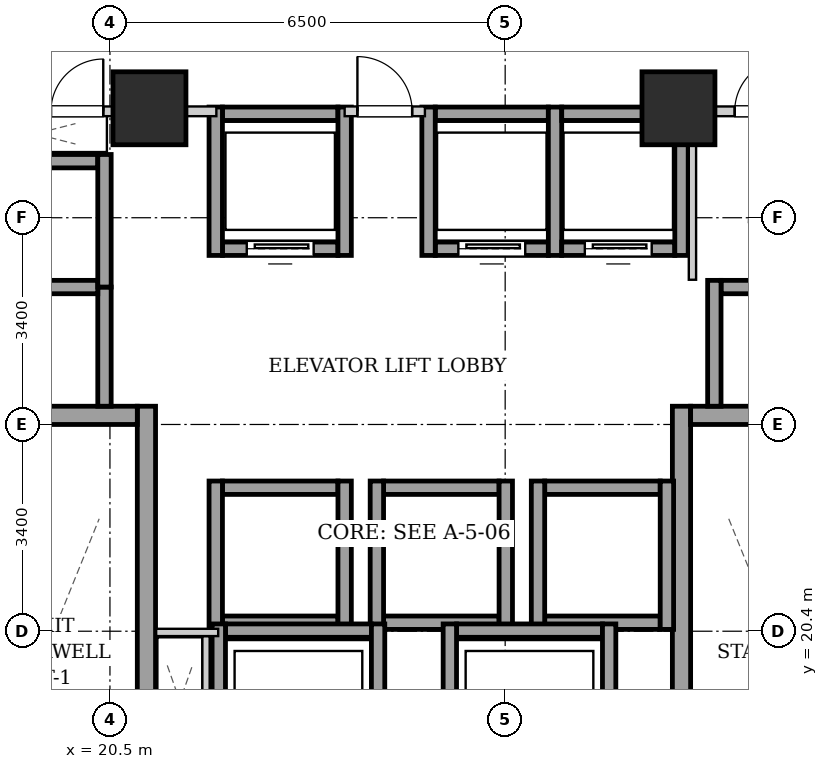
"""IFC4 building model, lengths in metres.
Left out: names, types, materials, properties, quantities, classifications, styles, units other than length and angle.
Written with IfcOpenShell. Run it as: python <this file> out.ifc"""

import sys

from ifc_helpers import new_model, si_unit, direction, frame, frame_2d, origin, origin_2d, place, context, subcontext, project, spatial, rectangle, extrude, element, fill, save


model = new_model("IFC4")
c1 = context("Model", 3, precision=1e-05, world=origin(), true_north=direction((0.0, 1.0)))
c2 = subcontext(c1, "Body", "Model", "MODEL_VIEW")
j1 = project(units=[si_unit("LENGTHUNIT", "METRE"), si_unit("PLANEANGLEUNIT", "RADIAN")], contexts=[c1])
p1 = place(None, origin())
s1 = spatial("IfcSite", under=j1, at=p1, CompositionType="ELEMENT")
p2 = place(p1, origin())
s2 = spatial("IfcBuilding", under=s1, at=p2, CompositionType="ELEMENT")
p3 = place(p2, frame((0.0, 0.0, 51.4)))
s3 = spatial("IfcBuildingStorey", under=s2, at=p3, CompositionType="ELEMENT", Elevation=51.4)
for number, where, z_axis, x_axis in (
    (1, (21.15, 29.0, 0.0), (0.0, 0.0, 1.0), (1.0, 0.0, 0.0)),
    (2, (29.85, 29.0, 0.0), (0.0, 0.0, 1.0), (1.0, 0.0, 0.0)),
):
    element("IfcColumn", number, at=place(p3, frame(where, z_axis=z_axis, x_axis=x_axis)), inside=s3, PredefinedType="COLUMN", context=c2, shape_type="SweptSolid", body=[
        extrude(rectangle(XDim=1.2, YDim=1.2, at=origin_2d()), origin(), (0.0, 0.0, 1.0), 3.2),
    ])
p4 = place(p3, frame((21.1, 15.1, 0.0), z_axis=(0.0, 0.0, 1.0), x_axis=(0.0, 1.0, 0.0)))
e3 = element("IfcWall", 3, at=p4, inside=s3, PredefinedType="SHEAR", context=c2, shape_type="SweptSolid", body=[
    extrude(rectangle(XDim=9.0, YDim=0.3, at=frame_2d((4.5, 0.0))), origin(), (0.0, 0.0, 1.0), 2.94),
])
p5 = place(p3, frame((18.1, 23.95, 0.0), z_axis=(0.0, 0.0, 1.0), x_axis=(1.0, 0.0, 0.0)))
e4 = element("IfcWall", 4, at=p5, inside=s3, PredefinedType="SHEAR", context=c2, shape_type="SweptSolid", body=[
    extrude(rectangle(XDim=2.85, YDim=0.3, at=frame_2d((1.425, 0.0))), origin(), (0.0, 0.0, 1.0), 2.94),
])
p6 = place(p3, frame((29.9, 15.1, 0.0), z_axis=(0.0, 0.0, 1.0), x_axis=(0.0, 1.0, 0.0)))
e5 = element("IfcWall", 5, at=p6, inside=s3, PredefinedType="SHEAR", context=c2, shape_type="SweptSolid", body=[
    extrude(rectangle(XDim=9.0, YDim=0.3, at=frame_2d((4.5, 0.0))), origin(), (0.0, 0.0, 1.0), 2.94),
])
p7 = place(p3, frame((30.05, 23.95, 0.0), z_axis=(0.0, 0.0, 1.0), x_axis=(1.0, 0.0, 0.0)))
e6 = element("IfcWall", 6, at=p7, inside=s3, PredefinedType="SHEAR", context=c2, shape_type="SweptSolid", body=[
    extrude(rectangle(XDim=2.85, YDim=0.3, at=frame_2d((1.425, 0.0))), origin(), (0.0, 0.0, 1.0), 2.94),
])
p8 = place(p3, frame((22.35, 26.69, 0.0), z_axis=(0.0, 0.0, 1.0), x_axis=(1.0, 0.0, 0.0)))
e7 = element("IfcWall", 7, at=p8, inside=s3, PredefinedType="SHEAR", context=c2, shape_type="SweptSolid", body=[
    extrude(rectangle(XDim=1.9, YDim=0.22, at=frame_2d((0.95, 0.0))), origin(), (0.0, 0.0, 1.0), 2.94),
])
p9 = place(p8, frame((0.4, 0.0, 0.0)))
e8 = element("IfcOpeningElement", 8, at=p9, cuts=e7, PredefinedType="OPENING", context=c2, shape_type="SweptSolid", body=[
    extrude(rectangle(XDim=1.1, YDim=2.15, at=frame_2d((0.55, 1.075))), frame((0.0, 0.12, 0.0), z_axis=(0.0, -1.0, 0.0), x_axis=(1.0, 0.0, 0.0)), (0.0, 0.0, 1.0), 0.24),
])
p10 = place(p3, frame((22.35, 28.91, 0.0), z_axis=(0.0, 0.0, 1.0), x_axis=(1.0, 0.0, 0.0)))
e9 = element("IfcWall", 9, at=p10, inside=s3, PredefinedType="SHEAR", context=c2, shape_type="SweptSolid", body=[
    extrude(rectangle(XDim=1.9, YDim=0.22, at=frame_2d((0.95, 0.0))), origin(), (0.0, 0.0, 1.0), 2.94),
])
for number, where, z_axis, x_axis in (
    (10, (22.24, 26.58, 0.0), (0.0, 0.0, 1.0), (0.0, 1.0, 0.0)),
    (11, (24.36, 26.58, 0.0), (0.0, 0.0, 1.0), (0.0, 1.0, 0.0)),
):
    element("IfcWall", number, at=place(p3, frame(where, z_axis=z_axis, x_axis=x_axis)), inside=s3, PredefinedType="SHEAR", context=c2, shape_type="SweptSolid", body=[
        extrude(rectangle(XDim=2.44, YDim=0.22, at=frame_2d((1.22, 0.0))), origin(), (0.0, 0.0, 1.0), 2.94),
    ])
p11 = place(p3, frame((25.85, 26.69, 0.0), z_axis=(0.0, 0.0, 1.0), x_axis=(1.0, 0.0, 0.0)))
e12 = element("IfcWall", 12, at=p11, inside=s3, PredefinedType="SHEAR", context=c2, shape_type="SweptSolid", body=[
    extrude(rectangle(XDim=1.86, YDim=0.22, at=frame_2d((0.93, 0.0))), origin(), (0.0, 0.0, 1.0), 2.94),
])
p12 = place(p11, frame((0.38, 0.0, 0.0)))
e13 = element("IfcOpeningElement", 13, at=p12, cuts=e12, PredefinedType="OPENING", context=c2, shape_type="SweptSolid", body=[
    extrude(rectangle(XDim=1.1, YDim=2.15, at=frame_2d((0.55, 1.075))), frame((0.0, 0.12, 0.0), z_axis=(0.0, -1.0, 0.0), x_axis=(1.0, 0.0, 0.0)), (0.0, 0.0, 1.0), 0.24),
])
p13 = place(p3, frame((25.85, 28.91, 0.0), z_axis=(0.0, 0.0, 1.0), x_axis=(1.0, 0.0, 0.0)))
e14 = element("IfcWall", 14, at=p13, inside=s3, PredefinedType="SHEAR", context=c2, shape_type="SweptSolid", body=[
    extrude(rectangle(XDim=1.86, YDim=0.22, at=frame_2d((0.93, 0.0))), origin(), (0.0, 0.0, 1.0), 2.94),
])
for number, where, z_axis, x_axis in (
    (15, (25.74, 26.58, 0.0), (0.0, 0.0, 1.0), (0.0, 1.0, 0.0)),
    (16, (27.82, 26.58, 0.0), (0.0, 0.0, 1.0), (0.0, 1.0, 0.0)),
):
    element("IfcWall", number, at=place(p3, frame(where, z_axis=z_axis, x_axis=x_axis)), inside=s3, PredefinedType="SHEAR", context=c2, shape_type="SweptSolid", body=[
        extrude(rectangle(XDim=2.44, YDim=0.22, at=frame_2d((1.22, 0.0))), origin(), (0.0, 0.0, 1.0), 2.94),
    ])
p14 = place(p3, frame((27.93, 26.69, 0.0), z_axis=(0.0, 0.0, 1.0), x_axis=(1.0, 0.0, 0.0)))
e17 = element("IfcWall", 17, at=p14, inside=s3, PredefinedType="SHEAR", context=c2, shape_type="SweptSolid", body=[
    extrude(rectangle(XDim=1.86, YDim=0.22, at=frame_2d((0.93, 0.0))), origin(), (0.0, 0.0, 1.0), 2.94),
])
p15 = place(p14, frame((0.38, 0.0, 0.0)))
e18 = element("IfcOpeningElement", 18, at=p15, cuts=e17, PredefinedType="OPENING", context=c2, shape_type="SweptSolid", body=[
    extrude(rectangle(XDim=1.1, YDim=2.15, at=frame_2d((0.55, 1.075))), frame((0.0, 0.12, 0.0), z_axis=(0.0, -1.0, 0.0), x_axis=(1.0, 0.0, 0.0)), (0.0, 0.0, 1.0), 0.24),
])
p16 = place(p3, frame((27.93, 28.91, 0.0), z_axis=(0.0, 0.0, 1.0), x_axis=(1.0, 0.0, 0.0)))
e19 = element("IfcWall", 19, at=p16, inside=s3, PredefinedType="SHEAR", context=c2, shape_type="SweptSolid", body=[
    extrude(rectangle(XDim=1.86, YDim=0.22, at=frame_2d((0.93, 0.0))), origin(), (0.0, 0.0, 1.0), 2.94),
])
p17 = place(p3, frame((29.9, 26.58, 0.0), z_axis=(0.0, 0.0, 1.0), x_axis=(0.0, 1.0, 0.0)))
e20 = element("IfcWall", 20, at=p17, inside=s3, PredefinedType="SHEAR", context=c2, shape_type="SweptSolid", body=[
    extrude(rectangle(XDim=2.44, YDim=0.22, at=frame_2d((1.22, 0.0))), origin(), (0.0, 0.0, 1.0), 2.94),
])
for number, where, z_axis, x_axis in (
    (21, (22.35, 20.54, 0.0), (0.0, 0.0, 1.0), (1.0, 0.0, 0.0)),
    (22, (22.35, 22.76, 0.0), (0.0, 0.0, 1.0), (1.0, 0.0, 0.0)),
):
    element("IfcWall", number, at=place(p3, frame(where, z_axis=z_axis, x_axis=x_axis)), inside=s3, PredefinedType="SHEAR", context=c2, shape_type="SweptSolid", body=[
        extrude(rectangle(XDim=1.9, YDim=0.22, at=frame_2d((0.95, 0.0))), origin(), (0.0, 0.0, 1.0), 2.94),
    ])
for number, where, z_axis, x_axis in (
    (23, (22.24, 20.43, 0.0), (0.0, 0.0, 1.0), (0.0, 1.0, 0.0)),
    (24, (24.36, 20.43, 0.0), (0.0, 0.0, 1.0), (0.0, 1.0, 0.0)),
):
    element("IfcWall", number, at=place(p3, frame(where, z_axis=z_axis, x_axis=x_axis)), inside=s3, PredefinedType="SHEAR", context=c2, shape_type="SweptSolid", body=[
        extrude(rectangle(XDim=2.44, YDim=0.22, at=frame_2d((1.22, 0.0))), origin(), (0.0, 0.0, 1.0), 2.94),
    ])
for number, where, z_axis, x_axis in (
    (25, (25.0, 20.54, 0.0), (0.0, 0.0, 1.0), (1.0, 0.0, 0.0)),
    (26, (25.0, 22.76, 0.0), (0.0, 0.0, 1.0), (1.0, 0.0, 0.0)),
):
    element("IfcWall", number, at=place(p3, frame(where, z_axis=z_axis, x_axis=x_axis)), inside=s3, PredefinedType="SHEAR", context=c2, shape_type="SweptSolid", body=[
        extrude(rectangle(XDim=1.9, YDim=0.22, at=frame_2d((0.95, 0.0))), origin(), (0.0, 0.0, 1.0), 2.94),
    ])
for number, where, z_axis, x_axis in (
    (27, (24.89, 20.43, 0.0), (0.0, 0.0, 1.0), (0.0, 1.0, 0.0)),
    (28, (27.01, 20.43, 0.0), (0.0, 0.0, 1.0), (0.0, 1.0, 0.0)),
):
    element("IfcWall", number, at=place(p3, frame(where, z_axis=z_axis, x_axis=x_axis)), inside=s3, PredefinedType="SHEAR", context=c2, shape_type="SweptSolid", body=[
        extrude(rectangle(XDim=2.44, YDim=0.22, at=frame_2d((1.22, 0.0))), origin(), (0.0, 0.0, 1.0), 2.94),
    ])
for number, where, z_axis, x_axis in (
    (29, (27.65, 20.54, 0.0), (0.0, 0.0, 1.0), (1.0, 0.0, 0.0)),
    (30, (27.65, 22.76, 0.0), (0.0, 0.0, 1.0), (1.0, 0.0, 0.0)),
):
    element("IfcWall", number, at=place(p3, frame(where, z_axis=z_axis, x_axis=x_axis)), inside=s3, PredefinedType="SHEAR", context=c2, shape_type="SweptSolid", body=[
        extrude(rectangle(XDim=1.9, YDim=0.22, at=frame_2d((0.95, 0.0))), origin(), (0.0, 0.0, 1.0), 2.94),
    ])
for number, where, z_axis, x_axis in (
    (31, (27.54, 20.43, 0.0), (0.0, 0.0, 1.0), (0.0, 1.0, 0.0)),
    (32, (29.66, 20.43, 0.0), (0.0, 0.0, 1.0), (0.0, 1.0, 0.0)),
):
    element("IfcWall", number, at=place(p3, frame(where, z_axis=z_axis, x_axis=x_axis)), inside=s3, PredefinedType="SHEAR", context=c2, shape_type="SweptSolid", body=[
        extrude(rectangle(XDim=2.44, YDim=0.22, at=frame_2d((1.22, 0.0))), origin(), (0.0, 0.0, 1.0), 2.94),
    ])
p18 = place(p3, frame((20.41, 24.1, 0.0), z_axis=(0.0, 0.0, 1.0), x_axis=(0.0, 1.0, 0.0)))
e33 = element("IfcWall", 33, at=p18, inside=s3, PredefinedType="SHEAR", context=c2, shape_type="SweptSolid", body=[
    extrude(rectangle(XDim=1.96, YDim=0.22, at=frame_2d((0.98, 0.0))), origin(), (0.0, 0.0, 1.0), 2.94),
])
for number, where, z_axis, x_axis in (
    (34, (18.4, 26.06, 0.0), (0.0, 0.0, 1.0), (1.0, 0.0, 0.0)),
    (35, (18.4, 28.13, 0.0), (0.0, 0.0, 1.0), (1.0, 0.0, 0.0)),
):
    element("IfcWall", number, at=place(p3, frame(where, z_axis=z_axis, x_axis=x_axis)), inside=s3, PredefinedType="SHEAR", context=c2, shape_type="SweptSolid", body=[
        extrude(rectangle(XDim=1.9, YDim=0.22, at=frame_2d((0.95, 0.0))), origin(), (0.0, 0.0, 1.0), 2.94),
    ])
p19 = place(p3, frame((20.41, 26.06, 0.0), z_axis=(0.0, 0.0, 1.0), x_axis=(0.0, 1.0, 0.0)))
e36 = element("IfcWall", 36, at=p19, inside=s3, PredefinedType="SHEAR", context=c2, shape_type="SweptSolid", body=[
    extrude(rectangle(XDim=2.18, YDim=0.22, at=frame_2d((1.09, 0.0))), origin(), (0.0, 0.0, 1.0), 2.94),
])
p20 = place(p3, frame((30.55, 26.06, 0.0), z_axis=(0.0, 0.0, 1.0), x_axis=(1.0, 0.0, 0.0)))
e37 = element("IfcWall", 37, at=p20, inside=s3, PredefinedType="SHEAR", context=c2, shape_type="SweptSolid", body=[
    extrude(rectangle(XDim=1.9, YDim=0.22, at=frame_2d((0.95, 0.0))), origin(), (0.0, 0.0, 1.0), 2.94),
])
p21 = place(p3, frame((30.44, 24.1, 0.0), z_axis=(0.0, 0.0, 1.0), x_axis=(0.0, 1.0, 0.0)))
e38 = element("IfcWall", 38, at=p21, inside=s3, PredefinedType="SHEAR", context=c2, shape_type="SweptSolid", body=[
    extrude(rectangle(XDim=2.07, YDim=0.22, at=frame_2d((1.035, 0.0))), origin(), (0.0, 0.0, 1.0), 2.94),
])
p22 = place(p3, frame((22.4, 20.41, 0.0), z_axis=(0.0, 0.0, 1.0), x_axis=(1.0, 0.0, 0.0)))
e39 = element("IfcWall", 39, at=p22, inside=s3, PredefinedType="SHEAR", context=c2, shape_type="SweptSolid", body=[
    extrude(rectangle(XDim=2.4, YDim=0.22, at=frame_2d((1.2, 0.0))), origin(), (0.0, 0.0, 1.0), 2.94),
])
for number, where, z_axis, x_axis in (
    (40, (22.29, 17.98, 0.0), (0.0, 0.0, 1.0), (0.0, 1.0, 0.0)),
    (41, (24.91, 17.98, 0.0), (0.0, 0.0, 1.0), (0.0, 1.0, 0.0)),
):
    element("IfcWall", number, at=place(p3, frame(where, z_axis=z_axis, x_axis=x_axis)), inside=s3, PredefinedType="SHEAR", context=c2, shape_type="SweptSolid", body=[
        extrude(rectangle(XDim=2.54, YDim=0.22, at=frame_2d((1.27, 0.0))), origin(), (0.0, 0.0, 1.0), 2.94),
    ])
p23 = place(p3, frame((26.2, 20.41, 0.0), z_axis=(0.0, 0.0, 1.0), x_axis=(1.0, 0.0, 0.0)))
e42 = element("IfcWall", 42, at=p23, inside=s3, PredefinedType="SHEAR", context=c2, shape_type="SweptSolid", body=[
    extrude(rectangle(XDim=2.4, YDim=0.22, at=frame_2d((1.2, 0.0))), origin(), (0.0, 0.0, 1.0), 2.94),
])
for number, where, z_axis, x_axis in (
    (43, (26.09, 17.98, 0.0), (0.0, 0.0, 1.0), (0.0, 1.0, 0.0)),
    (44, (28.71, 17.98, 0.0), (0.0, 0.0, 1.0), (0.0, 1.0, 0.0)),
):
    element("IfcWall", number, at=place(p3, frame(where, z_axis=z_axis, x_axis=x_axis)), inside=s3, PredefinedType="SHEAR", context=c2, shape_type="SweptSolid", body=[
        extrude(rectangle(XDim=2.54, YDim=0.22, at=frame_2d((1.27, 0.0))), origin(), (0.0, 0.0, 1.0), 2.94),
    ])
p24 = place(p3, frame((24.36, 28.95, 0.0), z_axis=(0.0, 0.0, 1.0), x_axis=(1.0, 0.0, 0.0)))
e45 = element("IfcWall", 45, at=p24, inside=s3, PredefinedType="PARTITIONING", context=c2, shape_type="SweptSolid", body=[
    extrude(rectangle(XDim=1.32, YDim=0.16, at=frame_2d((0.66, 0.0))), origin(), (0.0, 0.0, 1.0), 2.232),
])
p25 = place(p24, frame((0.21, 0.0, 0.0)))
e46 = element("IfcOpeningElement", 46, at=p25, cuts=e45, PredefinedType="OPENING", context=c2, shape_type="SweptSolid", body=[
    extrude(rectangle(XDim=0.9, YDim=2.05, at=frame_2d((0.45, 1.025))), frame((0.0, 0.09, 0.0), z_axis=(0.0, -1.0, 0.0), x_axis=(1.0, 0.0, 0.0)), (0.0, 0.0, 1.0), 0.18),
])
p26 = place(p3, frame((17.96, 28.95, 0.0), z_axis=(0.0, 0.0, 1.0), x_axis=(1.0, 0.0, 0.0)))
e47 = element("IfcWall", 47, at=p26, inside=s3, PredefinedType="PARTITIONING", context=c2, shape_type="SweptSolid", body=[
    extrude(rectangle(XDim=4.29, YDim=0.16, at=frame_2d((2.145, 0.0))), origin(), (0.0, 0.0, 1.0), 2.232),
])
p27 = place(p26, frame((1.57, 0.0, 0.0)))
e48 = element("IfcOpeningElement", 48, at=p27, cuts=e47, PredefinedType="OPENING", context=c2, shape_type="SweptSolid", body=[
    extrude(rectangle(XDim=0.86, YDim=2.05, at=frame_2d((0.43, 1.025))), frame((0.0, 0.09, 0.0), z_axis=(0.0, -1.0, 0.0), x_axis=(1.0, 0.0, 0.0)), (0.0, 0.0, 1.0), 0.18),
])
p28 = place(p3, frame((22.08, 18.2, 0.0), z_axis=(0.0, 0.0, 1.0), x_axis=(0.0, 1.0, 0.0)))
e49 = element("IfcWall", 49, at=p28, inside=s3, PredefinedType="PARTITIONING", context=c2, shape_type="SweptSolid", body=[
    extrude(rectangle(XDim=2.12, YDim=0.12, at=frame_2d((1.06, 0.0))), origin(), (0.0, 0.0, 1.0), 2.94),
])
p29 = place(p3, frame((22.28, 20.38, 0.0), z_axis=(0.0, 0.0, 1.0), x_axis=(-1.0, 0.0, 0.0)))
e50 = element("IfcWall", 50, at=p29, inside=s3, PredefinedType="PARTITIONING", context=c2, shape_type="SweptSolid", body=[
    extrude(rectangle(XDim=1.02, YDim=0.12, at=frame_2d((0.51, 0.0))), origin(), (0.0, 0.0, 1.0), 2.94),
])
p30 = place(p3, frame((30.08, 26.18, 0.0), z_axis=(0.0, 0.0, 1.0), x_axis=(0.0, 1.0, 0.0)))
e51 = element("IfcWall", 51, at=p30, inside=s3, PredefinedType="PARTITIONING", context=c2, shape_type="SweptSolid", body=[
    extrude(rectangle(XDim=2.68, YDim=0.12, at=frame_2d((1.34, 0.0))), origin(), (0.0, 0.0, 1.0), 2.94),
])
p31 = place(p3, frame((30.08, 28.95, 0.0), z_axis=(0.0, 0.0, 1.0), x_axis=(1.0, 0.0, 0.0)))
e52 = element("IfcWall", 52, at=p31, inside=s3, PredefinedType="PARTITIONING", context=c2, shape_type="SweptSolid", body=[
    extrude(rectangle(XDim=2.96, YDim=0.16, at=frame_2d((1.48, 0.0))), origin(), (0.0, 0.0, 1.0), 2.94),
])
p32 = place(p31, frame((0.695, 0.0, 0.0)))
e53 = element("IfcOpeningElement", 53, at=p32, cuts=e52, PredefinedType="OPENING", context=c2, shape_type="SweptSolid", body=[
    extrude(rectangle(XDim=0.86, YDim=2.05, at=frame_2d((0.43, 1.025))), frame((0.0, 0.09, 0.0), z_axis=(0.0, -1.0, 0.0), x_axis=(1.0, 0.0, 0.0)), (0.0, 0.0, 1.0), 0.18),
])
p33 = place(p9, origin())
e54 = element("IfcDoor", 54, at=p33, inside=s3, OperationType="SLIDING_TO_LEFT", PredefinedType="DOOR", context=c2, shape_type="SweptSolid", body=[
    extrude(rectangle(XDim=1.1, YDim=2.15, at=frame_2d((0.55, 1.075))), frame((0.0, 0.025, 0.0), z_axis=(0.0, -1.0, 0.0), x_axis=(1.0, 0.0, 0.0)), (0.0, 0.0, 1.0), 0.05),
])
fill(e8, e54)
p34 = place(p12, origin())
e55 = element("IfcDoor", 55, at=p34, inside=s3, OperationType="SLIDING_TO_LEFT", PredefinedType="DOOR", context=c2, shape_type="SweptSolid", body=[
    extrude(rectangle(XDim=1.1, YDim=2.15, at=frame_2d((0.55, 1.075))), frame((0.0, 0.025, 0.0), z_axis=(0.0, -1.0, 0.0), x_axis=(1.0, 0.0, 0.0)), (0.0, 0.0, 1.0), 0.05),
])
fill(e13, e55)
p35 = place(p15, origin())
e56 = element("IfcDoor", 56, at=p35, inside=s3, OperationType="SLIDING_TO_LEFT", PredefinedType="DOOR", context=c2, shape_type="SweptSolid", body=[
    extrude(rectangle(XDim=1.1, YDim=2.15, at=frame_2d((0.55, 1.075))), frame((0.0, 0.025, 0.0), z_axis=(0.0, -1.0, 0.0), x_axis=(1.0, 0.0, 0.0)), (0.0, 0.0, 1.0), 0.05),
])
fill(e18, e56)
p36 = place(p25, origin())
e57 = element("IfcDoor", 57, at=p36, inside=s3, OperationType="SINGLE_SWING_LEFT", PredefinedType="DOOR", context=c2, shape_type="SweptSolid", body=[
    extrude(rectangle(XDim=0.9, YDim=2.05, at=frame_2d((0.45, 1.025))), frame((0.0, 0.025, 0.0), z_axis=(0.0, -1.0, 0.0), x_axis=(1.0, 0.0, 0.0)), (0.0, 0.0, 1.0), 0.05),
])
fill(e46, e57)
p37 = place(p27, origin())
e58 = element("IfcDoor", 58, at=p37, inside=s3, OperationType="SINGLE_SWING_RIGHT", PredefinedType="DOOR", context=c2, shape_type="SweptSolid", body=[
    extrude(rectangle(XDim=0.86, YDim=2.05, at=frame_2d((0.43, 1.025))), frame((0.0, 0.025, 0.0), z_axis=(0.0, -1.0, 0.0), x_axis=(1.0, 0.0, 0.0)), (0.0, 0.0, 1.0), 0.05),
])
fill(e48, e58)
p38 = place(p32, origin())
e59 = element("IfcDoor", 59, at=p38, inside=s3, OperationType="SINGLE_SWING_RIGHT", PredefinedType="DOOR", context=c2, shape_type="SweptSolid", body=[
    extrude(rectangle(XDim=0.86, YDim=2.05, at=frame_2d((0.43, 1.025))), frame((0.0, 0.025, 0.0), z_axis=(0.0, -1.0, 0.0), x_axis=(1.0, 0.0, 0.0)), (0.0, 0.0, 1.0), 0.05),
])
fill(e53, e59)
save(model, sys.argv[1])
